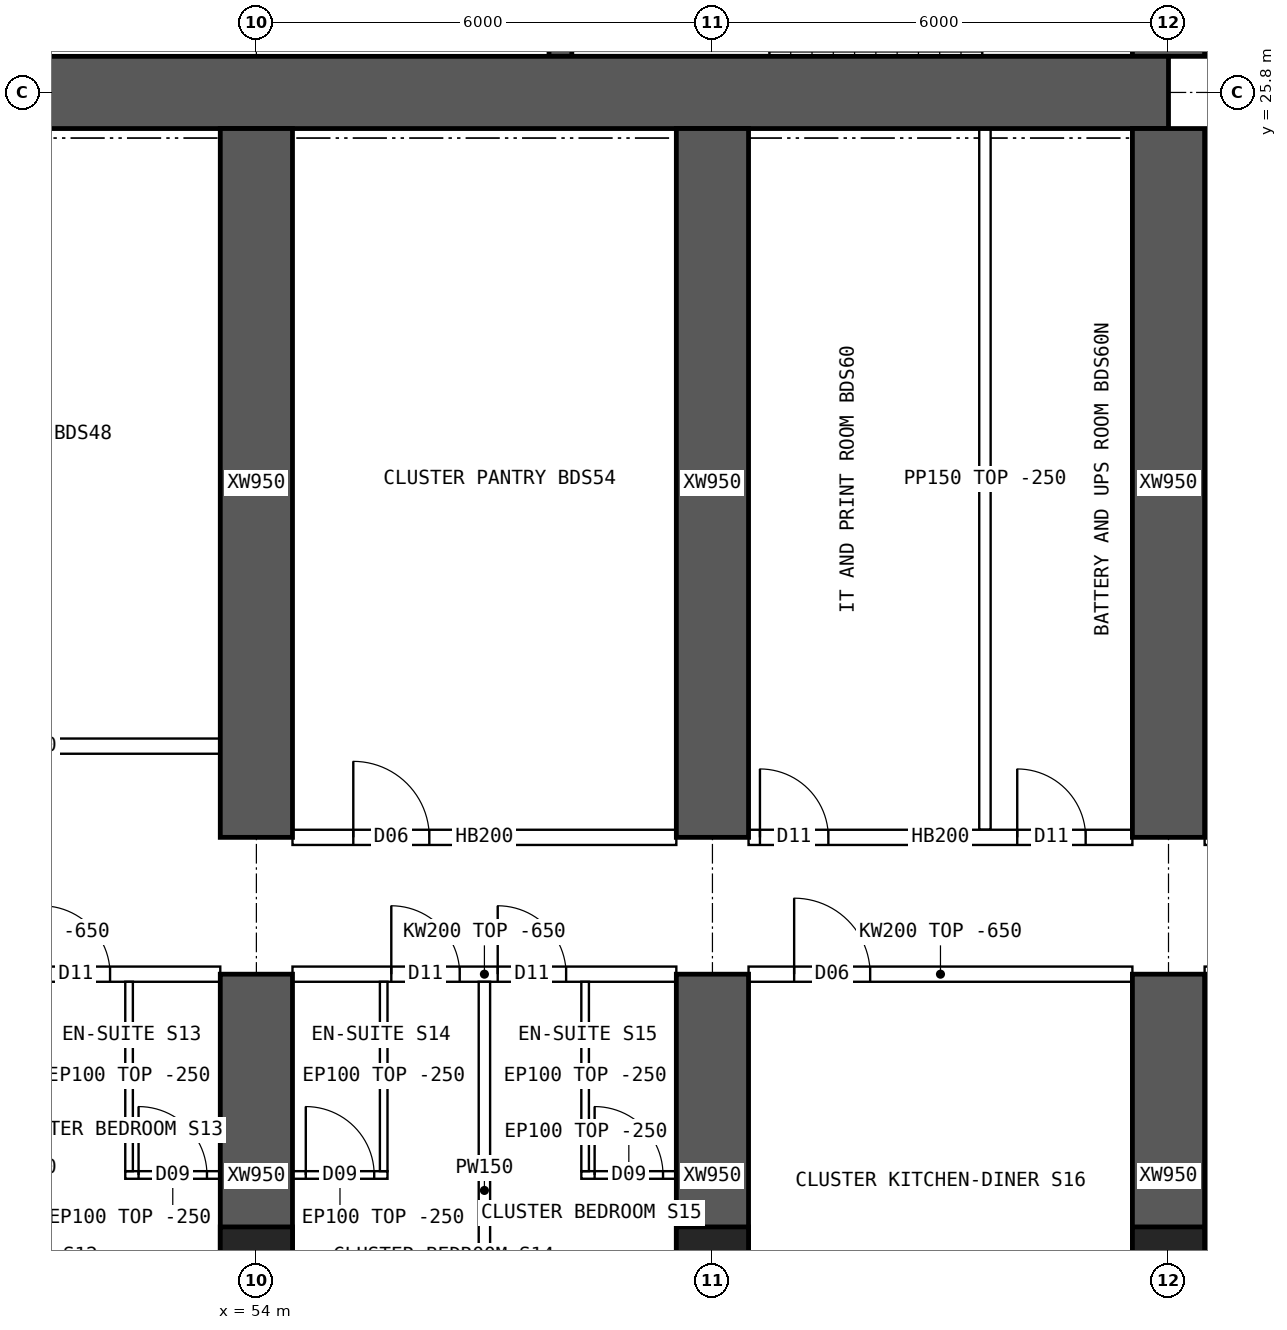
"""IFC4 building model, lengths in metres.
Left out: names, types, materials, properties, quantities, classifications, styles, units other than length and angle.
Written with IfcOpenShell. Run it as: python <this file> out.ifc"""

import sys

from ifc_helpers import new_model, si_unit, direction, frame, frame_2d, origin, origin_2d, place, context, subcontext, project, spatial, polyline, rectangle, hollow_rectangle, outline, extrude, element, fill, save


model = new_model("IFC4")
c1 = context("Model", 3, precision=1e-05, world=origin(), true_north=direction((0.0, 1.0)))
c2 = subcontext(c1, "Body", "Model", "MODEL_VIEW")
j1 = project(units=[si_unit("LENGTHUNIT", "METRE"), si_unit("PLANEANGLEUNIT", "RADIAN")], contexts=[c1])
p1 = place(None, origin())
s1 = spatial("IfcSite", under=j1, at=p1, CompositionType="ELEMENT")
p2 = place(p1, origin())
s2 = spatial("IfcBuilding", under=s1, at=p2, CompositionType="ELEMENT")
p3 = place(p2, frame((0.0, 0.0, 125.65)))
s3 = spatial("IfcBuildingStorey", under=s2, at=p3, CompositionType="ELEMENT", Elevation=125.65)
for number, where, z_axis, x_axis in (
    (1, (54.0, 10.4, 0.0), (0.0, 0.0, 1.0), (1.0, 0.0, 0.0)),
    (2, (60.0, 10.4, 0.0), (0.0, 0.0, 1.0), (1.0, 0.0, 0.0)),
    (3, (66.0, 10.4, 0.0), (0.0, 0.0, 1.0), (1.0, 0.0, 0.0)),
):
    element("IfcColumn", number, at=place(p3, frame(where, z_axis=z_axis, x_axis=x_axis)), inside=s3, PredefinedType="COLUMN", context=c2, shape_type="SweptSolid", body=[
        extrude(hollow_rectangle(XDim=0.95, YDim=0.95, WallThickness=0.095, at=origin_2d()), origin(), (0.0, 0.0, 1.0), 3.75),
    ])
p4 = place(p3, frame((18.0, 25.8, 0.0), z_axis=(0.0, 0.0, 1.0), x_axis=(1.0, 0.0, 0.0)))
e4 = element("IfcWall", 4, at=p4, inside=s3, PredefinedType="SHEAR", context=c2, shape_type="SweptSolid", body=[
    extrude(rectangle(XDim=48.0, YDim=0.95, at=frame_2d((24.0, 0.0))), origin(), (0.0, 0.0, 1.0), 3.75),
])
p5 = place(p3, frame((66.0, 26.275, 0.0), z_axis=(0.0, 0.0, 1.0), x_axis=(0.0, 1.0, 0.0)))
e5 = element("IfcWall", 5, at=p5, inside=s3, PredefinedType="SHEAR", context=c2, shape_type="SweptSolid", body=[
    extrude(rectangle(XDim=11.45, YDim=0.95, at=frame_2d((5.725, 0.0))), origin(), (0.0, 0.0, 1.0), 3.75),
])
p6 = place(p5, frame((5.025, 0.0, 0.0)))
e6 = element("IfcOpeningElement", 6, at=p6, cuts=e5, PredefinedType="OPENING", context=c2, shape_type="SweptSolid", body=[
    extrude(rectangle(XDim=1.2, YDim=2.1, at=frame_2d((0.6, 1.05))), frame((0.0, 0.485, 0.0), z_axis=(0.0, -1.0, 0.0), x_axis=(1.0, 0.0, 0.0)), (0.0, 0.0, 1.0), 0.97),
])
p7 = place(p3, frame((58.0, 26.275, 0.0), z_axis=(0.0, 0.0, 1.0), x_axis=(0.0, 1.0, 0.0)))
e7 = element("IfcWall", 7, at=p7, inside=s3, PredefinedType="SHEAR", context=c2, shape_type="SweptSolid", body=[
    extrude(rectangle(XDim=3.975, YDim=0.3, at=frame_2d((1.988, 0.0))), origin(), (0.0, 0.0, 1.0), 3.75),
])
p8 = place(p3, frame((54.0, 8.9, 0.0), z_axis=(0.0, 0.0, 1.0), x_axis=(0.0, 1.0, 0.0)))
e8 = element("IfcWall", 8, at=p8, inside=s3, PredefinedType="SHEAR", context=c2, shape_type="SweptSolid", body=[
    extrude(rectangle(XDim=5.3, YDim=0.95, at=frame_2d((2.65, 0.0))), origin(), (0.0, 0.0, 1.0), 3.75),
])
p9 = place(p3, frame((54.0, 16.0, 0.0), z_axis=(0.0, 0.0, 1.0), x_axis=(0.0, 1.0, 0.0)))
e9 = element("IfcWall", 9, at=p9, inside=s3, PredefinedType="SHEAR", context=c2, shape_type="SweptSolid", body=[
    extrude(rectangle(XDim=9.325, YDim=0.95, at=frame_2d((4.663, 0.0))), origin(), (0.0, 0.0, 1.0), 3.75),
])
p10 = place(p3, frame((60.0, 8.9, 0.0), z_axis=(0.0, 0.0, 1.0), x_axis=(0.0, 1.0, 0.0)))
e10 = element("IfcWall", 10, at=p10, inside=s3, PredefinedType="SHEAR", context=c2, shape_type="SweptSolid", body=[
    extrude(rectangle(XDim=5.3, YDim=0.95, at=frame_2d((2.65, 0.0))), origin(), (0.0, 0.0, 1.0), 3.75),
])
p11 = place(p3, frame((60.0, 16.0, 0.0), z_axis=(0.0, 0.0, 1.0), x_axis=(0.0, 1.0, 0.0)))
e11 = element("IfcWall", 11, at=p11, inside=s3, PredefinedType="SHEAR", context=c2, shape_type="SweptSolid", body=[
    extrude(rectangle(XDim=9.325, YDim=0.95, at=frame_2d((4.663, 0.0))), origin(), (0.0, 0.0, 1.0), 3.75),
])
p12 = place(p3, frame((66.0, 8.9, 0.0), z_axis=(0.0, 0.0, 1.0), x_axis=(0.0, 1.0, 0.0)))
e12 = element("IfcWall", 12, at=p12, inside=s3, PredefinedType="SHEAR", context=c2, shape_type="SweptSolid", body=[
    extrude(rectangle(XDim=5.3, YDim=0.95, at=frame_2d((2.65, 0.0))), origin(), (0.0, 0.0, 1.0), 3.75),
])
p13 = place(p3, frame((66.0, 16.0, 0.0), z_axis=(0.0, 0.0, 1.0), x_axis=(0.0, 1.0, 0.0)))
e13 = element("IfcWall", 13, at=p13, inside=s3, PredefinedType="SHEAR", context=c2, shape_type="SweptSolid", body=[
    extrude(rectangle(XDim=9.325, YDim=0.95, at=frame_2d((4.663, 0.0))), origin(), (0.0, 0.0, 1.0), 3.75),
])
p14 = place(p3, frame((48.475, 14.2, 0.0), z_axis=(0.0, 0.0, 1.0), x_axis=(1.0, 0.0, 0.0)))
e14 = element("IfcWall", 14, at=p14, inside=s3, PredefinedType="SOLIDWALL", context=c2, shape_type="SweptSolid", body=[
    extrude(outline(polyline([(0.0, 0.0), (5.05, 0.0), (5.05, 3.1), (0.0, 3.1), (0.0, 0.0)])), frame((0.0, 0.1, 0.0), z_axis=(0.0, -1.0, 0.0), x_axis=(1.0, 0.0, 0.0)), (0.0, 0.0, 1.0), 0.2),
])
p15 = place(p14, frame((1.3, 0.0, 0.0)))
e15 = element("IfcOpeningElement", 15, at=p15, cuts=e14, PredefinedType="OPENING", context=c2, shape_type="SweptSolid", body=[
    extrude(rectangle(XDim=0.9, YDim=2.1, at=frame_2d((0.45, 1.05))), frame((0.0, 0.11, 0.0), z_axis=(0.0, -1.0, 0.0), x_axis=(1.0, 0.0, 0.0)), (0.0, 0.0, 1.0), 0.22),
])
p16 = place(p14, frame((2.7, 0.0, 0.0)))
e16 = element("IfcOpeningElement", 16, at=p16, cuts=e14, PredefinedType="OPENING", context=c2, shape_type="SweptSolid", body=[
    extrude(rectangle(XDim=0.9, YDim=2.1, at=frame_2d((0.45, 1.05))), frame((0.0, 0.11, 0.0), z_axis=(0.0, -1.0, 0.0), x_axis=(1.0, 0.0, 0.0)), (0.0, 0.0, 1.0), 0.22),
])
p17 = place(p3, frame((54.475, 14.2, 0.0), z_axis=(0.0, 0.0, 1.0), x_axis=(1.0, 0.0, 0.0)))
e17 = element("IfcWall", 17, at=p17, inside=s3, PredefinedType="SOLIDWALL", context=c2, shape_type="SweptSolid", body=[
    extrude(outline(polyline([(0.0, 0.0), (5.05, 0.0), (5.05, 3.1), (0.0, 3.1), (0.0, 0.0)])), frame((0.0, 0.1, 0.0), z_axis=(0.0, -1.0, 0.0), x_axis=(1.0, 0.0, 0.0)), (0.0, 0.0, 1.0), 0.2),
])
p18 = place(p17, frame((1.3, 0.0, 0.0)))
e18 = element("IfcOpeningElement", 18, at=p18, cuts=e17, PredefinedType="OPENING", context=c2, shape_type="SweptSolid", body=[
    extrude(rectangle(XDim=0.9, YDim=2.1, at=frame_2d((0.45, 1.05))), frame((0.0, 0.11, 0.0), z_axis=(0.0, -1.0, 0.0), x_axis=(1.0, 0.0, 0.0)), (0.0, 0.0, 1.0), 0.22),
])
p19 = place(p17, frame((2.7, 0.0, 0.0)))
e19 = element("IfcOpeningElement", 19, at=p19, cuts=e17, PredefinedType="OPENING", context=c2, shape_type="SweptSolid", body=[
    extrude(rectangle(XDim=0.9, YDim=2.1, at=frame_2d((0.45, 1.05))), frame((0.0, 0.11, 0.0), z_axis=(0.0, -1.0, 0.0), x_axis=(1.0, 0.0, 0.0)), (0.0, 0.0, 1.0), 0.22),
])
p20 = place(p3, frame((54.475, 16.0, 0.0), z_axis=(0.0, 0.0, 1.0), x_axis=(1.0, 0.0, 0.0)))
e20 = element("IfcWall", 20, at=p20, inside=s3, PredefinedType="SOLIDWALL", context=c2, shape_type="SweptSolid", body=[
    extrude(rectangle(XDim=5.05, YDim=0.2, at=frame_2d((2.525, 0.0))), origin(), (0.0, 0.0, 1.0), 3.5),
])
p21 = place(p20, frame((0.8, 0.0, 0.0)))
e21 = element("IfcOpeningElement", 21, at=p21, cuts=e20, PredefinedType="OPENING", context=c2, shape_type="SweptSolid", body=[
    extrude(rectangle(XDim=1.0, YDim=2.1, at=frame_2d((0.5, 1.05))), frame((0.0, 0.11, 0.0), z_axis=(0.0, -1.0, 0.0), x_axis=(1.0, 0.0, 0.0)), (0.0, 0.0, 1.0), 0.22),
])
p22 = place(p3, frame((60.475, 14.2, 0.0), z_axis=(0.0, 0.0, 1.0), x_axis=(1.0, 0.0, 0.0)))
e22 = element("IfcWall", 22, at=p22, inside=s3, PredefinedType="SOLIDWALL", context=c2, shape_type="SweptSolid", body=[
    extrude(outline(polyline([(0.0, 0.0), (5.05, 0.0), (5.05, 3.1), (0.0, 3.1), (0.0, 0.0)])), frame((0.0, 0.1, 0.0), z_axis=(0.0, -1.0, 0.0), x_axis=(1.0, 0.0, 0.0)), (0.0, 0.0, 1.0), 0.2),
])
p23 = place(p22, frame((0.6, 0.0, 0.0)))
e23 = element("IfcOpeningElement", 23, at=p23, cuts=e22, PredefinedType="OPENING", context=c2, shape_type="SweptSolid", body=[
    extrude(rectangle(XDim=1.0, YDim=2.1, at=frame_2d((0.5, 1.05))), frame((0.0, 0.11, 0.0), z_axis=(0.0, -1.0, 0.0), x_axis=(1.0, 0.0, 0.0)), (0.0, 0.0, 1.0), 0.22),
])
p24 = place(p3, frame((60.475, 16.0, 0.0), z_axis=(0.0, 0.0, 1.0), x_axis=(1.0, 0.0, 0.0)))
e24 = element("IfcWall", 24, at=p24, inside=s3, PredefinedType="SOLIDWALL", context=c2, shape_type="SweptSolid", body=[
    extrude(rectangle(XDim=5.05, YDim=0.2, at=frame_2d((2.525, 0.0))), origin(), (0.0, 0.0, 1.0), 3.5),
])
p25 = place(p24, frame((0.15, 0.0, 0.0)))
e25 = element("IfcOpeningElement", 25, at=p25, cuts=e24, PredefinedType="OPENING", context=c2, shape_type="SweptSolid", body=[
    extrude(rectangle(XDim=0.9, YDim=2.1, at=frame_2d((0.45, 1.05))), frame((0.0, 0.11, 0.0), z_axis=(0.0, -1.0, 0.0), x_axis=(1.0, 0.0, 0.0)), (0.0, 0.0, 1.0), 0.22),
])
p26 = place(p24, frame((3.535, 0.0, 0.0)))
e26 = element("IfcOpeningElement", 26, at=p26, cuts=e24, PredefinedType="OPENING", context=c2, shape_type="SweptSolid", body=[
    extrude(rectangle(XDim=0.9, YDim=2.1, at=frame_2d((0.45, 1.05))), frame((0.0, 0.11, 0.0), z_axis=(0.0, -1.0, 0.0), x_axis=(1.0, 0.0, 0.0)), (0.0, 0.0, 1.0), 0.22),
])
p27 = place(p3, frame((66.475, 14.2, 0.0), z_axis=(0.0, 0.0, 1.0), x_axis=(1.0, 0.0, 0.0)))
e27 = element("IfcWall", 27, at=p27, inside=s3, PredefinedType="SOLIDWALL", context=c2, shape_type="SweptSolid", body=[
    extrude(rectangle(XDim=1.925, YDim=0.2, at=frame_2d((0.962, 0.0))), origin(), (0.0, 0.0, 1.0), 3.5),
])
p28 = place(p27, frame((0.2, 0.0, 0.0)))
e28 = element("IfcOpeningElement", 28, at=p28, cuts=e27, PredefinedType="OPENING", context=c2, shape_type="SweptSolid", body=[
    extrude(rectangle(XDim=0.9, YDim=2.1, at=frame_2d((0.45, 1.05))), frame((0.0, 0.11, 0.0), z_axis=(0.0, -1.0, 0.0), x_axis=(1.0, 0.0, 0.0)), (0.0, 0.0, 1.0), 0.22),
])
p29 = place(p3, frame((66.475, 16.0, 0.0), z_axis=(0.0, 0.0, 1.0), x_axis=(1.0, 0.0, 0.0)))
e29 = element("IfcWall", 29, at=p29, inside=s3, PredefinedType="SOLIDWALL", context=c2, shape_type="SweptSolid", body=[
    extrude(rectangle(XDim=1.925, YDim=0.2, at=frame_2d((0.962, 0.0))), origin(), (0.0, 0.0, 1.0), 3.5),
])
p30 = place(p29, frame((0.05, 0.0, 0.0)))
e30 = element("IfcOpeningElement", 30, at=p30, cuts=e29, PredefinedType="OPENING", context=c2, shape_type="SweptSolid", body=[
    extrude(rectangle(XDim=1.2, YDim=2.1, at=frame_2d((0.6, 1.05))), frame((0.0, 0.11, 0.0), z_axis=(0.0, -1.0, 0.0), x_axis=(1.0, 0.0, 0.0)), (0.0, 0.0, 1.0), 0.22),
])
p31 = place(p3, frame((53.525, 11.558, 0.0), z_axis=(0.0, 0.0, 1.0), x_axis=(-1.0, 0.0, 0.0)))
e31 = element("IfcWall", 31, at=p31, inside=s3, PredefinedType="PARTITIONING", context=c2, shape_type="SweptSolid", body=[
    extrude(rectangle(XDim=1.25, YDim=0.1, at=frame_2d((0.625, 0.0))), origin(), (0.0, 0.0, 1.0), 3.5),
])
p32 = place(p31, frame((0.175, 0.0, 0.0)))
e32 = element("IfcOpeningElement", 32, at=p32, cuts=e31, PredefinedType="OPENING", context=c2, shape_type="SweptSolid", body=[
    extrude(rectangle(XDim=0.9, YDim=2.1, at=frame_2d((0.45, 1.05))), frame((0.0, 0.06, 0.0), z_axis=(0.0, -1.0, 0.0), x_axis=(1.0, 0.0, 0.0)), (0.0, 0.0, 1.0), 0.12),
])
p33 = place(p3, frame((52.325, 11.608, 0.0), z_axis=(0.0, 0.0, 1.0), x_axis=(0.0, 1.0, 0.0)))
e33 = element("IfcWall", 33, at=p33, inside=s3, PredefinedType="PARTITIONING", context=c2, shape_type="SweptSolid", body=[
    extrude(outline(polyline([(0.0, 0.0), (2.492, 0.0), (2.492, 3.1), (2.444, 3.1), (2.442, 3.5), (0.0, 3.5), (0.0, 0.0)])), frame((0.0, 0.05, 0.0), z_axis=(0.0, -1.0, 0.0), x_axis=(1.0, 0.0, 0.0)), (0.0, 0.0, 1.0), 0.1),
])
p34 = place(p3, frame((57.0, 8.61, 0.0), z_axis=(0.0, 0.0, 1.0), x_axis=(0.0, 1.0, 0.0)))
e34 = element("IfcWall", 34, at=p34, inside=s3, PredefinedType="PARTITIONING", context=c2, shape_type="SweptSolid", body=[
    extrude(outline(polyline([(0.0, 0.0), (5.49, 0.0), (5.49, 3.1), (5.442, 3.1), (5.44, 3.5), (1.992, 3.5), (1.99, 3.1), (1.592, 3.1), (1.59, 3.5), (0.0, 3.5), (0.0, 0.0)])), frame((0.0, 0.075, 0.0), z_axis=(0.0, -1.0, 0.0), x_axis=(1.0, 0.0, 0.0)), (0.0, 0.0, 1.0), 0.15),
])
p35 = place(p3, frame((55.725, 11.558, 0.0), z_axis=(0.0, 0.0, 1.0), x_axis=(-1.0, 0.0, 0.0)))
e35 = element("IfcWall", 35, at=p35, inside=s3, PredefinedType="PARTITIONING", context=c2, shape_type="SweptSolid", body=[
    extrude(rectangle(XDim=1.25, YDim=0.1, at=frame_2d((0.625, 0.0))), origin(), (0.0, 0.0, 1.0), 3.5),
])
p36 = place(p35, frame((0.175, 0.0, 0.0)))
e36 = element("IfcOpeningElement", 36, at=p36, cuts=e35, PredefinedType="OPENING", context=c2, shape_type="SweptSolid", body=[
    extrude(rectangle(XDim=0.9, YDim=2.1, at=frame_2d((0.45, 1.05))), frame((0.0, 0.06, 0.0), z_axis=(0.0, -1.0, 0.0), x_axis=(1.0, 0.0, 0.0)), (0.0, 0.0, 1.0), 0.12),
])
p37 = place(p3, frame((55.675, 11.608, 0.0), z_axis=(0.0, 0.0, 1.0), x_axis=(0.0, 1.0, 0.0)))
e37 = element("IfcWall", 37, at=p37, inside=s3, PredefinedType="PARTITIONING", context=c2, shape_type="SweptSolid", body=[
    extrude(outline(polyline([(0.0, 0.0), (2.492, 0.0), (2.492, 3.1), (2.444, 3.1), (2.442, 3.5), (0.0, 3.5), (0.0, 0.0)])), frame((0.0, 0.05, 0.0), z_axis=(0.0, -1.0, 0.0), x_axis=(1.0, 0.0, 0.0)), (0.0, 0.0, 1.0), 0.1),
])
p38 = place(p3, frame((59.525, 11.558, 0.0), z_axis=(0.0, 0.0, 1.0), x_axis=(-1.0, 0.0, 0.0)))
e38 = element("IfcWall", 38, at=p38, inside=s3, PredefinedType="PARTITIONING", context=c2, shape_type="SweptSolid", body=[
    extrude(rectangle(XDim=1.25, YDim=0.1, at=frame_2d((0.625, 0.0))), origin(), (0.0, 0.0, 1.0), 3.5),
])
p39 = place(p38, frame((0.175, 0.0, 0.0)))
e39 = element("IfcOpeningElement", 39, at=p39, cuts=e38, PredefinedType="OPENING", context=c2, shape_type="SweptSolid", body=[
    extrude(rectangle(XDim=0.9, YDim=2.1, at=frame_2d((0.45, 1.05))), frame((0.0, 0.06, 0.0), z_axis=(0.0, -1.0, 0.0), x_axis=(1.0, 0.0, 0.0)), (0.0, 0.0, 1.0), 0.12),
])
p40 = place(p3, frame((58.325, 11.608, 0.0), z_axis=(0.0, 0.0, 1.0), x_axis=(0.0, 1.0, 0.0)))
e40 = element("IfcWall", 40, at=p40, inside=s3, PredefinedType="PARTITIONING", context=c2, shape_type="SweptSolid", body=[
    extrude(outline(polyline([(0.0, 0.0), (2.492, 0.0), (2.492, 3.1), (2.444, 3.1), (2.442, 3.5), (0.0, 3.5), (0.0, 0.0)])), frame((0.0, 0.05, 0.0), z_axis=(0.0, -1.0, 0.0), x_axis=(1.0, 0.0, 0.0)), (0.0, 0.0, 1.0), 0.1),
])
p41 = place(p3, frame((48.475, 17.2, 0.0), z_axis=(0.0, 0.0, 1.0), x_axis=(1.0, 0.0, 0.0)))
e41 = element("IfcWall", 41, at=p41, inside=s3, PredefinedType="SOLIDWALL", context=c2, shape_type="SweptSolid", body=[
    extrude(rectangle(XDim=5.05, YDim=0.2, at=frame_2d((2.525, 0.0))), origin(), (0.0, 0.0, 1.0), 3.5),
])
p42 = place(p41, frame((0.4, 0.0, 0.0)))
e42 = element("IfcOpeningElement", 42, at=p42, cuts=e41, PredefinedType="OPENING", context=c2, shape_type="SweptSolid", body=[
    extrude(rectangle(XDim=1.0, YDim=2.1, at=frame_2d((0.5, 1.05))), frame((0.0, 0.11, 0.0), z_axis=(0.0, -1.0, 0.0), x_axis=(1.0, 0.0, 0.0)), (0.0, 0.0, 1.0), 0.22),
])
p43 = place(p3, frame((63.585, 16.1, 0.0), z_axis=(0.0, 0.0, 1.0), x_axis=(0.0, 1.0, 0.0)))
e43 = element("IfcWall", 43, at=p43, inside=s3, PredefinedType="PARTITIONING", context=c2, shape_type="SweptSolid", body=[
    extrude(rectangle(XDim=9.225, YDim=0.15, at=frame_2d((4.612, 0.0))), origin(), (0.0, 0.0, 1.0), 3.5),
])
p44 = place(p32, origin())
e44 = element("IfcDoor", 44, at=p44, inside=s3, OperationType="SINGLE_SWING_RIGHT", PredefinedType="DOOR", context=c2, shape_type="SweptSolid", body=[
    extrude(rectangle(XDim=0.9, YDim=2.1, at=frame_2d((0.45, 1.05))), frame((0.0, 0.025, 0.0), z_axis=(0.0, -1.0, 0.0), x_axis=(1.0, 0.0, 0.0)), (0.0, 0.0, 1.0), 0.05),
])
fill(e32, e44)
p45 = place(p16, origin())
e45 = element("IfcDoor", 45, at=p45, inside=s3, OperationType="SINGLE_SWING_LEFT", PredefinedType="DOOR", context=c2, shape_type="SweptSolid", body=[
    extrude(rectangle(XDim=0.9, YDim=2.1, at=frame_2d((0.45, 1.05))), frame((0.0, 0.025, 0.0), z_axis=(0.0, -1.0, 0.0), x_axis=(1.0, 0.0, 0.0)), (0.0, 0.0, 1.0), 0.05),
])
fill(e16, e45)
p46 = place(p36, origin())
e46 = element("IfcDoor", 46, at=p46, inside=s3, OperationType="SINGLE_SWING_RIGHT", PredefinedType="DOOR", context=c2, shape_type="SweptSolid", body=[
    extrude(rectangle(XDim=0.9, YDim=2.1, at=frame_2d((0.45, 1.05))), frame((0.0, 0.025, 0.0), z_axis=(0.0, -1.0, 0.0), x_axis=(1.0, 0.0, 0.0)), (0.0, 0.0, 1.0), 0.05),
])
fill(e36, e46)
p47 = place(p18, origin())
e47 = element("IfcDoor", 47, at=p47, inside=s3, OperationType="SINGLE_SWING_LEFT", PredefinedType="DOOR", context=c2, shape_type="SweptSolid", body=[
    extrude(rectangle(XDim=0.9, YDim=2.1, at=frame_2d((0.45, 1.05))), frame((0.0, 0.025, 0.0), z_axis=(0.0, -1.0, 0.0), x_axis=(1.0, 0.0, 0.0)), (0.0, 0.0, 1.0), 0.05),
])
fill(e18, e47)
p48 = place(p39, origin())
e48 = element("IfcDoor", 48, at=p48, inside=s3, OperationType="SINGLE_SWING_RIGHT", PredefinedType="DOOR", context=c2, shape_type="SweptSolid", body=[
    extrude(rectangle(XDim=0.9, YDim=2.1, at=frame_2d((0.45, 1.05))), frame((0.0, 0.025, 0.0), z_axis=(0.0, -1.0, 0.0), x_axis=(1.0, 0.0, 0.0)), (0.0, 0.0, 1.0), 0.05),
])
fill(e39, e48)
p49 = place(p19, origin())
e49 = element("IfcDoor", 49, at=p49, inside=s3, OperationType="SINGLE_SWING_LEFT", PredefinedType="DOOR", context=c2, shape_type="SweptSolid", body=[
    extrude(rectangle(XDim=0.9, YDim=2.1, at=frame_2d((0.45, 1.05))), frame((0.0, 0.025, 0.0), z_axis=(0.0, -1.0, 0.0), x_axis=(1.0, 0.0, 0.0)), (0.0, 0.0, 1.0), 0.05),
])
fill(e19, e49)
p50 = place(p23, origin())
e50 = element("IfcDoor", 50, at=p50, inside=s3, OperationType="SINGLE_SWING_LEFT", PredefinedType="DOOR", context=c2, shape_type="SweptSolid", body=[
    extrude(rectangle(XDim=1.0, YDim=2.1, at=frame_2d((0.5, 1.05))), frame((0.0, 0.025, 0.0), z_axis=(0.0, -1.0, 0.0), x_axis=(1.0, 0.0, 0.0)), (0.0, 0.0, 1.0), 0.05),
])
fill(e23, e50)
p51 = place(p21, origin())
e51 = element("IfcDoor", 51, at=p51, inside=s3, OperationType="SINGLE_SWING_LEFT", PredefinedType="DOOR", context=c2, shape_type="SweptSolid", body=[
    extrude(rectangle(XDim=1.0, YDim=2.1, at=frame_2d((0.5, 1.05))), frame((0.0, 0.025, 0.0), z_axis=(0.0, -1.0, 0.0), x_axis=(1.0, 0.0, 0.0)), (0.0, 0.0, 1.0), 0.05),
])
fill(e21, e51)
p52 = place(p25, origin())
e52 = element("IfcDoor", 52, at=p52, inside=s3, OperationType="SINGLE_SWING_LEFT", PredefinedType="DOOR", context=c2, shape_type="SweptSolid", body=[
    extrude(rectangle(XDim=0.9, YDim=2.1, at=frame_2d((0.45, 1.05))), frame((0.0, 0.025, 0.0), z_axis=(0.0, -1.0, 0.0), x_axis=(1.0, 0.0, 0.0)), (0.0, 0.0, 1.0), 0.05),
])
fill(e25, e52)
p53 = place(p26, origin())
e53 = element("IfcDoor", 53, at=p53, inside=s3, OperationType="SINGLE_SWING_LEFT", PredefinedType="DOOR", context=c2, shape_type="SweptSolid", body=[
    extrude(rectangle(XDim=0.9, YDim=2.1, at=frame_2d((0.45, 1.05))), frame((0.0, 0.025, 0.0), z_axis=(0.0, -1.0, 0.0), x_axis=(1.0, 0.0, 0.0)), (0.0, 0.0, 1.0), 0.05),
])
fill(e26, e53)
save(model, sys.argv[1])
